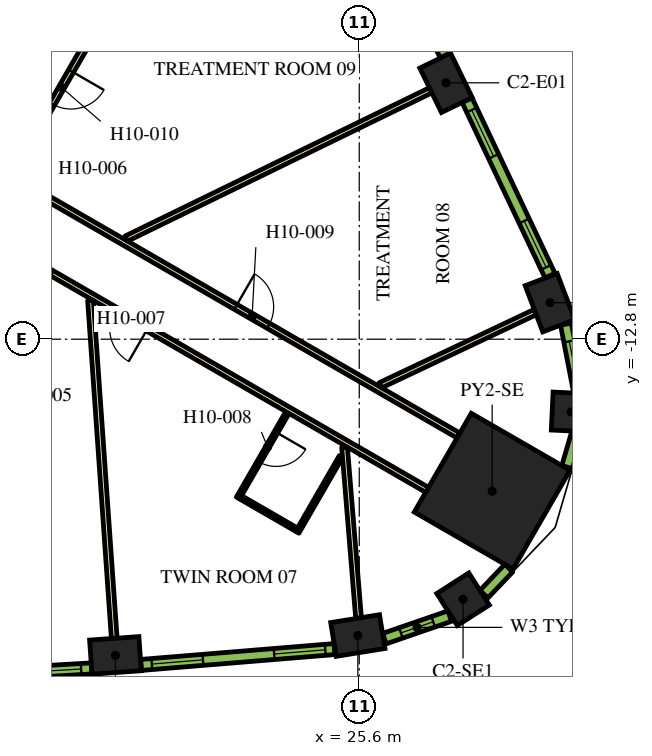
"""IFC4 building model, lengths in metres.
Left out: names, types, materials, properties, quantities, classifications, styles, units other than length and angle.
Written with IfcOpenShell. Run it as: python <this file> out.ifc"""

import sys

from ifc_helpers import new_model, si_unit, direction, frame, frame_2d, origin, origin_2d, place, context, subcontext, project, spatial, rectangle, extrude, element, fill, save


model = new_model("IFC4")
c1 = context("Model", 3, precision=1e-05, world=origin(), true_north=direction((0.0, 1.0)))
c2 = subcontext(c1, "Body", "Model", "MODEL_VIEW")
j1 = project(units=[si_unit("LENGTHUNIT", "METRE"), si_unit("PLANEANGLEUNIT", "RADIAN")], contexts=[c1])
p1 = place(None, origin())
s1 = spatial("IfcSite", under=j1, at=p1, CompositionType="ELEMENT")
p2 = place(p1, origin())
s2 = spatial("IfcBuilding", under=s1, at=p2, CompositionType="ELEMENT")
p3 = place(p2, frame((0.0, 0.0, 130.5)))
s3 = spatial("IfcBuildingStorey", under=s2, at=p3, CompositionType="ELEMENT", Elevation=130.5)
p4 = place(p3, frame((29.097, -16.799, 0.0), z_axis=(0.0, 0.0, 1.0), x_axis=(0.866025403784, -0.5, 0.0)))
e1 = element("IfcColumn", 1, at=p4, inside=s3, PredefinedType="COLUMN", context=c2, shape_type="SweptSolid", body=[
    extrude(rectangle(XDim=3.0, YDim=3.0, at=origin_2d()), origin(), (0.0, 0.0, 1.0), 3.9),
])
for number, where, z_axis, x_axis in (
    (2, (19.184, -21.12, 0.0), (0.0, 0.0, 1.0), (0.998, 0.07, 0.0)),
    (3, (25.563, -20.597, 0.0), (0.0, 0.0, 1.0), (0.987, 0.159, 0.0)),
):
    element("IfcColumn", number, at=place(p3, frame(where, z_axis=z_axis, x_axis=x_axis)), inside=s3, PredefinedType="COLUMN", context=c2, shape_type="SweptSolid", body=[
        extrude(rectangle(XDim=1.3, YDim=0.9, at=origin_2d()), origin(), (0.0, 0.0, 1.0), 3.9),
    ])
for number, where, z_axis, x_axis in (
    (4, (28.331, -19.643, 0.0), (0.0, 0.0, 1.0), (0.842, 0.54, 0.0)),
    (5, (31.177, -14.714, 0.0), (0.0, 0.0, 1.0), (0.047, 0.999, 0.0)),
):
    element("IfcColumn", number, at=place(p3, frame(where, z_axis=z_axis, x_axis=x_axis)), inside=s3, PredefinedType="COLUMN", context=c2, shape_type="SweptSolid", body=[
        extrude(rectangle(XDim=1.0, YDim=1.0, at=origin_2d()), origin(), (0.0, 0.0, 1.0), 3.9),
    ])
for number, where, z_axis, x_axis in (
    (6, (30.619, -11.839, 0.0), (0.0, 0.0, 1.0), (-0.355, 0.935, 0.0)),
    (7, (27.883, -6.054, 0.0), (0.0, 0.0, 1.0), (-0.438, 0.899, 0.0)),
):
    element("IfcColumn", number, at=place(p3, frame(where, z_axis=z_axis, x_axis=x_axis)), inside=s3, PredefinedType="COLUMN", context=c2, shape_type="SweptSolid", body=[
        extrude(rectangle(XDim=1.3, YDim=0.9, at=origin_2d()), origin(), (0.0, 0.0, 1.0), 3.9),
    ])
p5 = place(p3, frame((16.412, -8.523, 0.0), z_axis=(0.0, 0.0, 1.0), x_axis=(0.866025629663, -0.499999608766, 0.0)))
e8 = element("IfcWall", 8, at=p5, inside=s3, PredefinedType="PARTITIONING", context=c2, shape_type="SweptSolid", body=[
    extrude(rectangle(XDim=13.624, YDim=0.15, at=frame_2d((6.812, 0.0))), origin(), (0.0, 0.0, 1.0), 2.6),
])
p6 = place(p5, frame((6.854, 0.0, 0.0)))
e9 = element("IfcOpeningElement", 9, at=p6, cuts=e8, PredefinedType="OPENING", context=c2, shape_type="SweptSolid", body=[
    extrude(rectangle(XDim=1.0, YDim=2.1, at=frame_2d((0.5, 1.05))), frame((0.0, 0.085, 0.0), z_axis=(0.0, -1.0, 0.0), x_axis=(1.0, 0.0, 0.0)), (0.0, 0.0, 1.0), 0.17),
])
p7 = place(p3, frame((19.081, -3.9, 0.0), z_axis=(0.0, 0.0, 1.0), x_axis=(-0.499974327079, -0.866040225545, 0.0)))
e10 = element("IfcWall", 10, at=p7, inside=s3, PredefinedType="PARTITIONING", context=c2, shape_type="SweptSolid", body=[
    extrude(rectangle(XDim=5.258, YDim=0.15, at=frame_2d((2.629, 0.0))), origin(), (0.0, 0.0, 1.0), 2.6),
])
p8 = place(p7, frame((2.129, 0.0, 0.0)))
e11 = element("IfcOpeningElement", 11, at=p8, cuts=e10, PredefinedType="OPENING", context=c2, shape_type="SweptSolid", body=[
    extrude(rectangle(XDim=1.0, YDim=2.1, at=frame_2d((0.5, 1.05))), frame((0.0, 0.085, 0.0), z_axis=(0.0, -1.0, 0.0), x_axis=(1.0, 0.0, 0.0)), (0.0, 0.0, 1.0), 0.17),
])
p9 = place(p3, frame((27.386, -16.764, 0.0), z_axis=(0.0, 0.0, 1.0), x_axis=(-0.866022585856, 0.500004880763, 0.0)))
e12 = element("IfcWall", 12, at=p9, inside=s3, PredefinedType="PARTITIONING", context=c2, shape_type="SweptSolid", body=[
    extrude(rectangle(XDim=13.544, YDim=0.15, at=frame_2d((6.772, 0.0))), origin(), (0.0, 0.0, 1.0), 2.6),
])
p10 = place(p9, frame((11.392, 0.0, 0.0)))
e13 = element("IfcOpeningElement", 13, at=p10, cuts=e12, PredefinedType="OPENING", context=c2, shape_type="SweptSolid", body=[
    extrude(rectangle(XDim=0.9, YDim=2.1, at=frame_2d((0.45, 1.05))), frame((0.0, 0.085, 0.0), z_axis=(0.0, -1.0, 0.0), x_axis=(1.0, 0.0, 0.0)), (0.0, 0.0, 1.0), 0.17),
])
p11 = place(p9, frame((8.491, 0.0, 0.0)))
e14 = element("IfcOpeningElement", 14, at=p11, cuts=e12, PredefinedType="OPENING", context=c2, shape_type="SweptSolid", body=[
    extrude(rectangle(XDim=1.0, YDim=2.1, at=frame_2d((0.5, 1.05))), frame((0.0, 0.085, 0.0), z_axis=(0.0, -1.0, 0.0), x_axis=(1.0, 0.0, 0.0)), (0.0, 0.0, 1.0), 0.17),
])
p12 = place(p3, frame((19.153, -20.671, 0.0), z_axis=(0.0, 0.0, 1.0), x_axis=(-0.070070736723, 0.997542025107, 0.0)))
e15 = element("IfcWall", 15, at=p12, inside=s3, PredefinedType="PARTITIONING", context=c2, shape_type="SweptSolid", body=[
    extrude(rectangle(XDim=8.909, YDim=0.15, at=frame_2d((4.455, 0.0))), origin(), (0.0, 0.0, 1.0), 2.6),
])
p13 = place(p3, frame((27.479, -6.251, 0.0), z_axis=(0.0, 0.0, 1.0), x_axis=(-0.898945877276, -0.438059710231, 0.0)))
e16 = element("IfcWall", 16, at=p13, inside=s3, PredefinedType="PARTITIONING", context=c2, shape_type="SweptSolid", body=[
    extrude(rectangle(XDim=8.909, YDim=0.15, at=frame_2d((4.455, 0.0))), origin(), (0.0, 0.0, 1.0), 2.6),
])
p14 = place(p3, frame((25.582, -20.138, 0.0), z_axis=(0.0, 0.0, 1.0), x_axis=(-0.081746132986, 0.996653184283, 0.0)))
e17 = element("IfcWall", 17, at=p14, inside=s3, PredefinedType="PARTITIONING", context=c2, shape_type="SweptSolid", body=[
    extrude(rectangle(XDim=4.51, YDim=0.15, at=frame_2d((2.255, 0.0))), origin(), (0.0, 0.0, 1.0), 2.6),
])
p15 = place(p3, frame((30.231, -12.085, 0.0), z_axis=(0.0, 0.0, 1.0), x_axis=(-0.904001132572, -0.427530060122, 0.0)))
e18 = element("IfcWall", 18, at=p15, inside=s3, PredefinedType="PARTITIONING", context=c2, shape_type="SweptSolid", body=[
    extrude(rectangle(XDim=4.51, YDim=0.15, at=frame_2d((2.255, 0.0))), origin(), (0.0, 0.0, 1.0), 2.6),
])
p16 = place(p3, frame((23.71, -14.728, 0.0), z_axis=(0.0, 0.0, 1.0), x_axis=(-0.500006934395, -0.866021400173, 0.0)))
e19 = element("IfcWall", 19, at=p16, inside=s3, PredefinedType="PARTITIONING", context=c2, shape_type="SweptSolid", body=[
    extrude(rectangle(XDim=2.6, YDim=0.1, at=frame_2d((1.3, 0.0))), origin(), (0.0, 0.0, 1.0), 2.6),
])
p17 = place(p16, frame((0.6, 0.0, 0.0)))
e20 = element("IfcOpeningElement", 20, at=p17, cuts=e19, PredefinedType="OPENING", context=c2, shape_type="SweptSolid", body=[
    extrude(rectangle(XDim=0.9, YDim=2.1, at=frame_2d((0.45, 1.05))), frame((0.0, 0.06, 0.0), z_axis=(0.0, -1.0, 0.0), x_axis=(1.0, 0.0, 0.0)), (0.0, 0.0, 1.0), 0.12),
])
p18 = place(p3, frame((22.479, -16.962, 0.0), z_axis=(0.0, 0.0, 1.0), x_axis=(0.86605165483, -0.499954529098, 0.0)))
e21 = element("IfcWall", 21, at=p18, inside=s3, PredefinedType="PARTITIONING", context=c2, shape_type="SweptSolid", body=[
    extrude(rectangle(XDim=1.7, YDim=0.1, at=frame_2d((0.85, 0.0))), origin(), (0.0, 0.0, 1.0), 2.6),
])
p19 = place(p3, frame((25.119, -15.888, 0.0), z_axis=(0.0, 0.0, 1.0), x_axis=(-0.499998129301, -0.86602648383, 0.0)))
e22 = element("IfcWall", 22, at=p19, inside=s3, PredefinedType="PARTITIONING", context=c2, shape_type="SweptSolid", body=[
    extrude(rectangle(XDim=2.3, YDim=0.1, at=frame_2d((1.15, 0.0))), origin(), (0.0, 0.0, 1.0), 2.6),
])
p20 = place(p3, frame((13.462, -21.761, 0.0), z_axis=(0.0, 0.0, 1.0), x_axis=(0.998290511436, 0.058447025388, 0.0)))
e23 = element("IfcWall", 23, at=p20, inside=s3, PredefinedType="SOLIDWALL", context=c2, shape_type="SweptSolid", body=[
    extrude(rectangle(XDim=5.1, YDim=0.29, at=frame_2d((2.55, 0.0))), origin(), (0.0, 0.0, 1.0), 3.5),
])
p21 = place(p20, frame((0.272, 0.0, 0.9)))
e24 = element("IfcOpeningElement", 24, at=p21, cuts=e23, PredefinedType="OPENING", context=c2, shape_type="SweptSolid", body=[
    extrude(rectangle(XDim=1.35, YDim=2.15, at=frame_2d((0.675, 1.075))), frame((0.0, 0.155, 0.0), z_axis=(0.0, -1.0, 0.0), x_axis=(1.0, 0.0, 0.0)), (0.0, 0.0, 1.0), 0.31),
])
p22 = place(p20, frame((3.478, 0.0, 0.9)))
e25 = element("IfcOpeningElement", 25, at=p22, cuts=e23, PredefinedType="OPENING", context=c2, shape_type="SweptSolid", body=[
    extrude(rectangle(XDim=1.35, YDim=2.15, at=frame_2d((0.675, 1.075))), frame((0.0, 0.155, 0.0), z_axis=(0.0, -1.0, 0.0), x_axis=(1.0, 0.0, 0.0)), (0.0, 0.0, 1.0), 0.31),
])
p23 = place(p3, frame((19.857, -21.371, 0.0), z_axis=(0.0, 0.0, 1.0), x_axis=(0.99665273362, 0.081751627308, 0.0)))
e26 = element("IfcWall", 26, at=p23, inside=s3, PredefinedType="SOLIDWALL", context=c2, shape_type="SweptSolid", body=[
    extrude(rectangle(XDim=5.107, YDim=0.29, at=frame_2d((2.553, 0.0))), origin(), (0.0, 0.0, 1.0), 3.5),
])
p24 = place(p23, frame((0.285, 0.0, 0.9)))
e27 = element("IfcOpeningElement", 27, at=p24, cuts=e26, PredefinedType="OPENING", context=c2, shape_type="SweptSolid", body=[
    extrude(rectangle(XDim=1.35, YDim=2.15, at=frame_2d((0.675, 1.075))), frame((0.0, 0.155, 0.0), z_axis=(0.0, -1.0, 0.0), x_axis=(1.0, 0.0, 0.0)), (0.0, 0.0, 1.0), 0.31),
])
p25 = place(p23, frame((3.516, 0.0, 0.9)))
e28 = element("IfcOpeningElement", 28, at=p25, cuts=e26, PredefinedType="OPENING", context=c2, shape_type="SweptSolid", body=[
    extrude(rectangle(XDim=1.35, YDim=2.15, at=frame_2d((0.675, 1.075))), frame((0.0, 0.155, 0.0), z_axis=(0.0, -1.0, 0.0), x_axis=(1.0, 0.0, 0.0)), (0.0, 0.0, 1.0), 0.31),
])
p26 = place(p3, frame((26.261, -20.679, 0.0), z_axis=(0.0, 0.0, 1.0), x_axis=(0.945385815453, 0.325953462844, 0.0)))
e29 = element("IfcWall", 29, at=p26, inside=s3, PredefinedType="SOLIDWALL", context=c2, shape_type="SweptSolid", body=[
    extrude(rectangle(XDim=1.819, YDim=0.29, at=frame_2d((0.91, 0.0))), origin(), (0.0, 0.0, 1.0), 3.5),
])
p27 = place(p26, frame((0.46, 0.0, 0.9)))
e30 = element("IfcOpeningElement", 30, at=p27, cuts=e29, PredefinedType="OPENING", context=c2, shape_type="SweptSolid", body=[
    extrude(rectangle(XDim=0.9, YDim=2.15, at=frame_2d((0.45, 1.075))), frame((0.0, 0.155, 0.0), z_axis=(0.0, -1.0, 0.0), x_axis=(1.0, 0.0, 0.0)), (0.0, 0.0, 1.0), 0.31),
])
p28 = place(p3, frame((28.88, -19.509, 0.0), z_axis=(0.0, 0.0, 1.0), x_axis=(0.690414427296, 0.723414071319, 0.0)))
e31 = element("IfcWall", 31, at=p28, inside=s3, PredefinedType="SOLIDWALL", context=c2, shape_type="SweptSolid", body=[
    extrude(rectangle(XDim=0.947, YDim=0.29, at=frame_2d((0.474, 0.0))), origin(), (0.0, 0.0, 1.0), 3.5),
])
p29 = place(p3, frame((31.069, -16.165, 0.0), z_axis=(0.0, 0.0, 1.0), x_axis=(0.281454582132, 0.95957455062, 0.0)))
e32 = element("IfcWall", 32, at=p29, inside=s3, PredefinedType="SOLIDWALL", context=c2, shape_type="SweptSolid", body=[
    extrude(rectangle(XDim=0.947, YDim=0.29, at=frame_2d((0.474, 0.0))), origin(), (0.0, 0.0, 1.0), 3.5),
])
p30 = place(p3, frame((31.385, -14.189, 0.0), z_axis=(0.0, 0.0, 1.0), x_axis=(-0.190409913989, 0.981704672829, 0.0)))
e33 = element("IfcWall", 33, at=p30, inside=s3, PredefinedType="SOLIDWALL", context=c2, shape_type="SweptSolid", body=[
    extrude(rectangle(XDim=1.819, YDim=0.29, at=frame_2d((0.91, 0.0))), origin(), (0.0, 0.0, 1.0), 3.5),
])
p31 = place(p30, frame((0.46, 0.0, 0.9)))
e34 = element("IfcOpeningElement", 34, at=p31, cuts=e33, PredefinedType="OPENING", context=c2, shape_type="SweptSolid", body=[
    extrude(rectangle(XDim=0.9, YDim=2.15, at=frame_2d((0.45, 1.075))), frame((0.0, 0.155, 0.0), z_axis=(0.0, -1.0, 0.0), x_axis=(1.0, 0.0, 0.0)), (0.0, 0.0, 1.0), 0.31),
])
p32 = place(p3, frame((30.62, -11.127, 0.0), z_axis=(0.0, 0.0, 1.0), x_axis=(-0.427543726596, 0.903994669148, 0.0)))
e35 = element("IfcWall", 35, at=p32, inside=s3, PredefinedType="SOLIDWALL", context=c2, shape_type="SweptSolid", body=[
    extrude(rectangle(XDim=5.107, YDim=0.29, at=frame_2d((2.553, 0.0))), origin(), (0.0, 0.0, 1.0), 3.5),
])
p33 = place(p32, frame((0.24, 0.0, 0.9)))
e36 = element("IfcOpeningElement", 36, at=p33, cuts=e35, PredefinedType="OPENING", context=c2, shape_type="SweptSolid", body=[
    extrude(rectangle(XDim=1.35, YDim=2.15, at=frame_2d((0.675, 1.075))), frame((0.0, 0.155, 0.0), z_axis=(0.0, -1.0, 0.0), x_axis=(1.0, 0.0, 0.0)), (0.0, 0.0, 1.0), 0.31),
])
p34 = place(p32, frame((3.471, 0.0, 0.9)))
e37 = element("IfcOpeningElement", 37, at=p34, cuts=e35, PredefinedType="OPENING", context=c2, shape_type="SweptSolid", body=[
    extrude(rectangle(XDim=1.35, YDim=2.15, at=frame_2d((0.675, 1.075))), frame((0.0, 0.155, 0.0), z_axis=(0.0, -1.0, 0.0), x_axis=(1.0, 0.0, 0.0)), (0.0, 0.0, 1.0), 0.31),
])
p35 = place(p3, frame((27.864, -5.336, 0.0), z_axis=(0.0, 0.0, 1.0), x_axis=(-0.448534297211, 0.893765620409, 0.0)))
e38 = element("IfcWall", 38, at=p35, inside=s3, PredefinedType="SOLIDWALL", context=c2, shape_type="SweptSolid", body=[
    extrude(rectangle(XDim=5.1, YDim=0.29, at=frame_2d((2.55, 0.0))), origin(), (0.0, 0.0, 1.0), 3.5),
])
p36 = place(p35, frame((0.272, 0.0, 0.9)))
e39 = element("IfcOpeningElement", 39, at=p36, cuts=e38, PredefinedType="OPENING", context=c2, shape_type="SweptSolid", body=[
    extrude(rectangle(XDim=1.35, YDim=2.15, at=frame_2d((0.675, 1.075))), frame((0.0, 0.155, 0.0), z_axis=(0.0, -1.0, 0.0), x_axis=(1.0, 0.0, 0.0)), (0.0, 0.0, 1.0), 0.31),
])
p37 = place(p35, frame((3.478, 0.0, 0.9)))
e40 = element("IfcOpeningElement", 40, at=p37, cuts=e38, PredefinedType="OPENING", context=c2, shape_type="SweptSolid", body=[
    extrude(rectangle(XDim=1.35, YDim=2.15, at=frame_2d((0.675, 1.075))), frame((0.0, 0.155, 0.0), z_axis=(0.0, -1.0, 0.0), x_axis=(1.0, 0.0, 0.0)), (0.0, 0.0, 1.0), 0.31),
])
p38 = place(p11, origin())
e41 = element("IfcDoor", 41, at=p38, inside=s3, OperationType="SINGLE_SWING_RIGHT", PredefinedType="DOOR", context=c2, shape_type="SweptSolid", body=[
    extrude(rectangle(XDim=1.0, YDim=2.1, at=frame_2d((0.5, 1.05))), frame((0.0, 0.025, 0.0), z_axis=(0.0, -1.0, 0.0), x_axis=(1.0, 0.0, 0.0)), (0.0, 0.0, 1.0), 0.05),
])
fill(e14, e41)
p39 = place(p17, origin())
e42 = element("IfcDoor", 42, at=p39, inside=s3, OperationType="SINGLE_SWING_LEFT", PredefinedType="DOOR", context=c2, shape_type="SweptSolid", body=[
    extrude(rectangle(XDim=0.9, YDim=2.1, at=frame_2d((0.45, 1.05))), frame((0.0, 0.025, 0.0), z_axis=(0.0, -1.0, 0.0), x_axis=(1.0, 0.0, 0.0)), (0.0, 0.0, 1.0), 0.05),
])
fill(e20, e42)
p40 = place(p6, origin())
e43 = element("IfcDoor", 43, at=p40, inside=s3, OperationType="SINGLE_SWING_RIGHT", PredefinedType="DOOR", context=c2, shape_type="SweptSolid", body=[
    extrude(rectangle(XDim=1.0, YDim=2.1, at=frame_2d((0.5, 1.05))), frame((0.0, 0.025, 0.0), z_axis=(0.0, -1.0, 0.0), x_axis=(1.0, 0.0, 0.0)), (0.0, 0.0, 1.0), 0.05),
])
fill(e9, e43)
p41 = place(p8, origin())
e44 = element("IfcDoor", 44, at=p41, inside=s3, OperationType="SINGLE_SWING_LEFT", PredefinedType="DOOR", context=c2, shape_type="SweptSolid", body=[
    extrude(rectangle(XDim=1.0, YDim=2.1, at=frame_2d((0.5, 1.05))), frame((0.0, 0.025, 0.0), z_axis=(0.0, -1.0, 0.0), x_axis=(1.0, 0.0, 0.0)), (0.0, 0.0, 1.0), 0.05),
])
fill(e11, e44)
p42 = place(p22, origin())
e45 = element("IfcWindow", 45, at=p42, inside=s3, PartitioningType="DOUBLE_PANEL_VERTICAL", PredefinedType="WINDOW", context=c2, shape_type="SweptSolid", body=[
    extrude(rectangle(XDim=1.35, YDim=2.15, at=frame_2d((0.675, 1.075))), frame((0.0, 0.015, 0.0), z_axis=(0.0, -1.0, 0.0), x_axis=(1.0, 0.0, 0.0)), (0.0, 0.0, 1.0), 0.06),
])
fill(e25, e45)
p43 = place(p24, origin())
e46 = element("IfcWindow", 46, at=p43, inside=s3, PartitioningType="DOUBLE_PANEL_VERTICAL", PredefinedType="WINDOW", context=c2, shape_type="SweptSolid", body=[
    extrude(rectangle(XDim=1.35, YDim=2.15, at=frame_2d((0.675, 1.075))), frame((0.0, 0.015, 0.0), z_axis=(0.0, -1.0, 0.0), x_axis=(1.0, 0.0, 0.0)), (0.0, 0.0, 1.0), 0.06),
])
fill(e27, e46)
p44 = place(p25, origin())
e47 = element("IfcWindow", 47, at=p44, inside=s3, PartitioningType="DOUBLE_PANEL_VERTICAL", PredefinedType="WINDOW", context=c2, shape_type="SweptSolid", body=[
    extrude(rectangle(XDim=1.35, YDim=2.15, at=frame_2d((0.675, 1.075))), frame((0.0, 0.015, 0.0), z_axis=(0.0, -1.0, 0.0), x_axis=(1.0, 0.0, 0.0)), (0.0, 0.0, 1.0), 0.06),
])
fill(e28, e47)
p45 = place(p27, origin())
e48 = element("IfcWindow", 48, at=p45, inside=s3, PartitioningType="SINGLE_PANEL", PredefinedType="WINDOW", context=c2, shape_type="SweptSolid", body=[
    extrude(rectangle(XDim=0.9, YDim=2.15, at=frame_2d((0.45, 1.075))), frame((0.0, 0.015, 0.0), z_axis=(0.0, -1.0, 0.0), x_axis=(1.0, 0.0, 0.0)), (0.0, 0.0, 1.0), 0.06),
])
fill(e30, e48)
p46 = place(p31, origin())
e49 = element("IfcWindow", 49, at=p46, inside=s3, PartitioningType="SINGLE_PANEL", PredefinedType="WINDOW", context=c2, shape_type="SweptSolid", body=[
    extrude(rectangle(XDim=0.9, YDim=2.15, at=frame_2d((0.45, 1.075))), frame((0.0, 0.015, 0.0), z_axis=(0.0, -1.0, 0.0), x_axis=(1.0, 0.0, 0.0)), (0.0, 0.0, 1.0), 0.06),
])
fill(e34, e49)
p47 = place(p33, origin())
e50 = element("IfcWindow", 50, at=p47, inside=s3, PartitioningType="DOUBLE_PANEL_VERTICAL", PredefinedType="WINDOW", context=c2, shape_type="SweptSolid", body=[
    extrude(rectangle(XDim=1.35, YDim=2.15, at=frame_2d((0.675, 1.075))), frame((0.0, 0.015, 0.0), z_axis=(0.0, -1.0, 0.0), x_axis=(1.0, 0.0, 0.0)), (0.0, 0.0, 1.0), 0.06),
])
fill(e36, e50)
p48 = place(p34, origin())
e51 = element("IfcWindow", 51, at=p48, inside=s3, PartitioningType="DOUBLE_PANEL_VERTICAL", PredefinedType="WINDOW", context=c2, shape_type="SweptSolid", body=[
    extrude(rectangle(XDim=1.35, YDim=2.15, at=frame_2d((0.675, 1.075))), frame((0.0, 0.015, 0.0), z_axis=(0.0, -1.0, 0.0), x_axis=(1.0, 0.0, 0.0)), (0.0, 0.0, 1.0), 0.06),
])
fill(e37, e51)
save(model, sys.argv[1])
